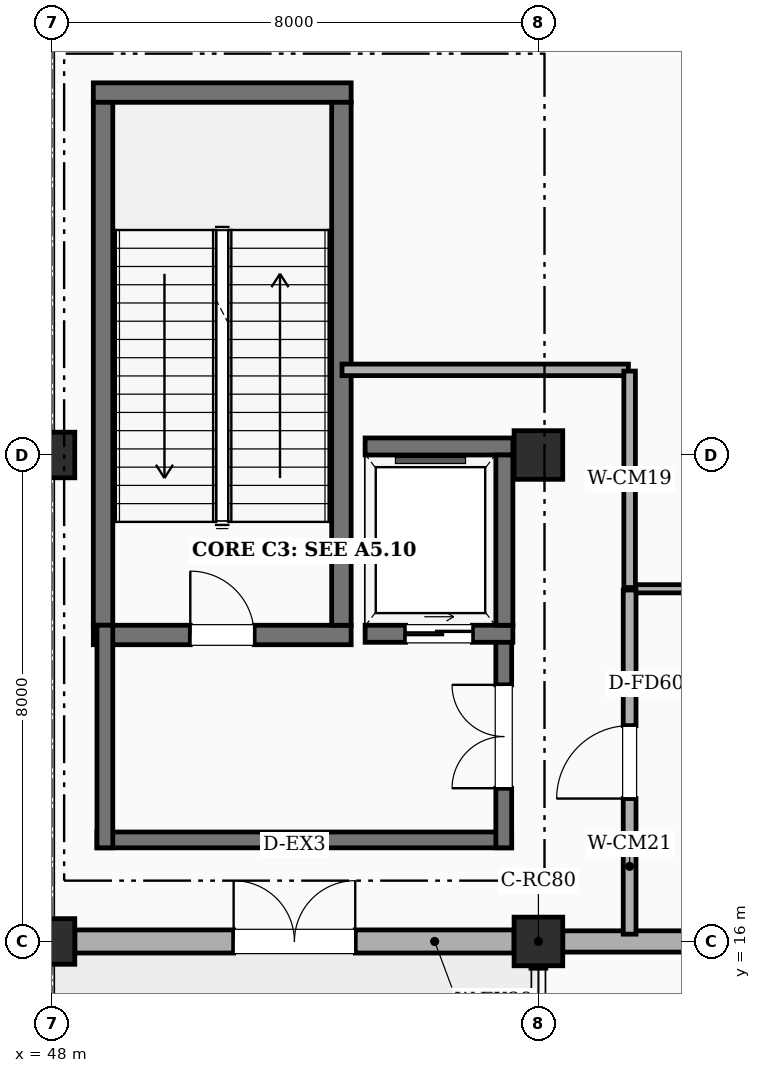
"""IFC4 building model, lengths in metres.
Left out: names, types, materials, properties, quantities, classifications, styles, units other than length and angle.
Written with IfcOpenShell. Run it as: python <this file> out.ifc"""

import sys

from ifc_helpers import new_model, si_unit, direction, frame, frame_2d, origin, origin_2d, place, context, subcontext, project, spatial, rectangle, extrude, element, fill, save


model = new_model("IFC4")
c1 = context("Model", 3, precision=1e-05, world=origin(), true_north=direction((0.0, 1.0)))
c2 = subcontext(c1, "Body", "Model", "MODEL_VIEW")
j1 = project(units=[si_unit("LENGTHUNIT", "METRE"), si_unit("PLANEANGLEUNIT", "RADIAN")], contexts=[c1])
p1 = place(None, origin())
s1 = spatial("IfcSite", under=j1, at=p1, CompositionType="ELEMENT")
p2 = place(p1, origin())
s2 = spatial("IfcBuilding", under=s1, at=p2, CompositionType="ELEMENT")
p3 = place(p2, origin())
s3 = spatial("IfcBuildingStorey", under=s2, at=p3, CompositionType="ELEMENT", Elevation=0.0)
for number, where, z_axis, x_axis in (
    (1, (48.0, 16.0, 0.0), (0.0, 0.0, 1.0), (1.0, 0.0, 0.0)),
    (2, (48.0, 24.0, 0.0), (0.0, 0.0, 1.0), (1.0, 0.0, 0.0)),
):
    element("IfcColumn", number, at=place(p3, frame(where, z_axis=z_axis, x_axis=x_axis)), inside=s3, PredefinedType="COLUMN", context=c2, shape_type="SweptSolid", body=[
        extrude(rectangle(XDim=0.75, YDim=0.75, at=origin_2d()), origin(), (0.0, 0.0, 1.0), 5.4),
    ])
for number, where, z_axis, x_axis in (
    (3, (56.0, 16.0, 0.0), (0.0, 0.0, 1.0), (1.0, 0.0, 0.0)),
    (4, (56.0, 24.0, 0.0), (0.0, 0.0, 1.0), (1.0, 0.0, 0.0)),
):
    element("IfcColumn", number, at=place(p3, frame(where, z_axis=z_axis, x_axis=x_axis)), inside=s3, PredefinedType="COLUMN", context=c2, shape_type="SweptSolid", body=[
        extrude(rectangle(XDim=0.8, YDim=0.8, at=origin_2d()), origin(), (0.0, 0.0, 1.0), 5.4),
    ])
p4 = place(p3, frame((48.375, 16.0, 0.0), z_axis=(0.0, 0.0, 1.0), x_axis=(1.0, 0.0, 0.0)))
e5 = element("IfcWall", 5, at=p4, inside=s3, PredefinedType="STANDARD", context=c2, shape_type="SweptSolid", body=[
    extrude(rectangle(XDim=7.225, YDim=0.38, at=frame_2d((3.613, 0.0))), origin(), (0.0, 0.0, 1.0), 4.42),
])
p5 = place(p4, frame((2.613, 0.0, 0.0)))
e6 = element("IfcOpeningElement", 6, at=p5, cuts=e5, PredefinedType="OPENING", context=c2, shape_type="SweptSolid", body=[
    extrude(rectangle(XDim=2.0, YDim=2.4, at=frame_2d((1.0, 1.2))), frame((0.0, 0.2, 0.0), z_axis=(0.0, -1.0, 0.0), x_axis=(1.0, 0.0, 0.0)), (0.0, 0.0, 1.0), 0.4),
])
p6 = place(p3, frame((56.4, 16.0, 0.0), z_axis=(0.0, 0.0, 1.0), x_axis=(1.0, 0.0, 0.0)))
e7 = element("IfcWall", 7, at=p6, inside=s3, PredefinedType="STANDARD", context=c2, shape_type="SweptSolid", body=[
    extrude(rectangle(XDim=7.2, YDim=0.35, at=frame_2d((3.6, 0.0))), origin(), (0.0, 0.0, 1.0), 4.42),
])
p7 = place(p6, frame((2.4, 0.0, 0.0)))
e8 = element("IfcOpeningElement", 8, at=p7, cuts=e7, PredefinedType="OPENING", context=c2, shape_type="SweptSolid", body=[
    extrude(rectangle(XDim=2.4, YDim=2.6, at=frame_2d((1.2, 1.3))), frame((0.0, 0.185, 0.0), z_axis=(0.0, -1.0, 0.0), x_axis=(1.0, 0.0, 0.0)), (0.0, 0.0, 1.0), 0.37),
])
p8 = place(p3, frame((48.68, 21.04, 0.0), z_axis=(0.0, 0.0, 1.0), x_axis=(1.0, 0.0, 0.0)))
e9 = element("IfcWall", 9, at=p8, inside=s3, PredefinedType="SHEAR", context=c2, shape_type="SweptSolid", body=[
    extrude(rectangle(XDim=4.24, YDim=0.32, at=frame_2d((2.12, 0.0))), origin(), (0.0, 0.0, 1.0), 5.4),
])
p9 = place(p8, frame((1.595, 0.0, 0.0)))
e10 = element("IfcOpeningElement", 10, at=p9, cuts=e9, PredefinedType="OPENING", context=c2, shape_type="SweptSolid", body=[
    extrude(rectangle(XDim=1.05, YDim=2.15, at=frame_2d((0.525, 1.075))), frame((0.0, 0.17, 0.0), z_axis=(0.0, -1.0, 0.0), x_axis=(1.0, 0.0, 0.0)), (0.0, 0.0, 1.0), 0.34),
])
p10 = place(p3, frame((48.68, 29.96, 0.0), z_axis=(0.0, 0.0, 1.0), x_axis=(1.0, 0.0, 0.0)))
e11 = element("IfcWall", 11, at=p10, inside=s3, PredefinedType="SHEAR", context=c2, shape_type="SweptSolid", body=[
    extrude(rectangle(XDim=4.24, YDim=0.32, at=frame_2d((2.12, 0.0))), origin(), (0.0, 0.0, 1.0), 5.4),
])
for number, where, z_axis, x_axis in (
    (12, (48.84, 21.2, 0.0), (0.0, 0.0, 1.0), (0.0, 1.0, 0.0)),
    (13, (52.76, 21.2, 0.0), (0.0, 0.0, 1.0), (0.0, 1.0, 0.0)),
):
    element("IfcWall", number, at=place(p3, frame(where, z_axis=z_axis, x_axis=x_axis)), inside=s3, PredefinedType="SHEAR", context=c2, shape_type="SweptSolid", body=[
        extrude(rectangle(XDim=8.6, YDim=0.32, at=frame_2d((4.3, 0.0))), origin(), (0.0, 0.0, 1.0), 5.4),
    ])
p11 = place(p3, frame((55.56, 17.67, 0.0), z_axis=(0.0, 0.0, 1.0), x_axis=(-1.0, 0.0, 0.0)))
e14 = element("IfcWall", 14, at=p11, inside=s3, PredefinedType="SHEAR", context=c2, shape_type="SweptSolid", body=[
    extrude(rectangle(XDim=6.82, YDim=0.26, at=frame_2d((3.41, 0.0))), origin(), (0.0, 0.0, 1.0), 5.4),
])
p12 = place(p3, frame((48.87, 17.54, 0.0), z_axis=(0.0, 0.0, 1.0), x_axis=(0.0, 1.0, 0.0)))
e15 = element("IfcWall", 15, at=p12, inside=s3, PredefinedType="SHEAR", context=c2, shape_type="SweptSolid", body=[
    extrude(rectangle(XDim=3.66, YDim=0.26, at=frame_2d((1.83, 0.0))), origin(), (0.0, 0.0, 1.0), 5.4),
])
p13 = place(p3, frame((55.43, 17.54, 0.0), z_axis=(0.0, 0.0, 1.0), x_axis=(0.0, 1.0, 0.0)))
e16 = element("IfcWall", 16, at=p13, inside=s3, PredefinedType="SHEAR", context=c2, shape_type="SweptSolid", body=[
    extrude(rectangle(XDim=3.66, YDim=0.26, at=frame_2d((1.83, 0.0))), origin(), (0.0, 0.0, 1.0), 5.4),
])
p14 = place(p13, frame((0.98, 0.0, 0.0)))
e17 = element("IfcOpeningElement", 17, at=p14, cuts=e16, PredefinedType="OPENING", context=c2, shape_type="SweptSolid", body=[
    extrude(rectangle(XDim=1.7, YDim=2.2, at=frame_2d((0.85, 1.1))), frame((0.0, 0.14, 0.0), z_axis=(0.0, -1.0, 0.0), x_axis=(1.0, 0.0, 0.0)), (0.0, 0.0, 1.0), 0.28),
])
p15 = place(p3, frame((53.15, 21.06, 0.0), z_axis=(0.0, 0.0, 1.0), x_axis=(1.0, 0.0, 0.0)))
e18 = element("IfcWall", 18, at=p15, inside=s3, PredefinedType="SHEAR", context=c2, shape_type="SweptSolid", body=[
    extrude(rectangle(XDim=2.43, YDim=0.28, at=frame_2d((1.215, 0.0))), origin(), (0.0, 0.0, 1.0), 5.4),
])
p16 = place(p15, frame((0.665, 0.0, 0.0)))
e19 = element("IfcOpeningElement", 19, at=p16, cuts=e18, PredefinedType="OPENING", context=c2, shape_type="SweptSolid", body=[
    extrude(rectangle(XDim=1.1, YDim=2.15, at=frame_2d((0.55, 1.075))), frame((0.0, 0.15, 0.0), z_axis=(0.0, -1.0, 0.0), x_axis=(1.0, 0.0, 0.0)), (0.0, 0.0, 1.0), 0.3),
])
p17 = place(p3, frame((53.15, 24.14, 0.0), z_axis=(0.0, 0.0, 1.0), x_axis=(1.0, 0.0, 0.0)))
e20 = element("IfcWall", 20, at=p17, inside=s3, PredefinedType="SHEAR", context=c2, shape_type="SweptSolid", body=[
    extrude(rectangle(XDim=2.43, YDim=0.28, at=frame_2d((1.215, 0.0))), origin(), (0.0, 0.0, 1.0), 5.4),
])
p18 = place(p3, frame((55.44, 21.2, 0.0), z_axis=(0.0, 0.0, 1.0), x_axis=(0.0, 1.0, 0.0)))
e21 = element("IfcWall", 21, at=p18, inside=s3, PredefinedType="SHEAR", context=c2, shape_type="SweptSolid", body=[
    extrude(rectangle(XDim=2.8, YDim=0.28, at=frame_2d((1.4, 0.0))), origin(), (0.0, 0.0, 1.0), 5.4),
])
p19 = place(p3, frame((57.52, 21.8, 0.0), z_axis=(0.0, 0.0, 1.0), x_axis=(1.0, 0.0, 0.0)))
e22 = element("IfcWall", 22, at=p19, inside=s3, PredefinedType="PARTITIONING", context=c2, shape_type="SweptSolid", body=[
    extrude(rectangle(XDim=52.96, YDim=0.135, at=frame_2d((26.48, 0.0))), origin(), (0.0, 0.0, 1.0), 4.27),
])
p20 = place(p19, frame((25.555, 0.0, 0.0)))
e23 = element("IfcOpeningElement", 23, at=p20, cuts=e22, PredefinedType="OPENING", context=c2, shape_type="SweptSolid", body=[
    extrude(rectangle(XDim=1.85, YDim=2.3, at=frame_2d((0.925, 1.15))), frame((0.0, 0.077, 0.0), z_axis=(0.0, -1.0, 0.0), x_axis=(1.0, 0.0, 0.0)), (0.0, 0.0, 1.0), 0.155),
])
p21 = place(p3, frame((52.77, 25.4, 0.0), z_axis=(0.0, 0.0, 1.0), x_axis=(1.0, 0.0, 0.0)))
e24 = element("IfcWall", 24, at=p21, inside=s3, PredefinedType="SOLIDWALL", context=c2, shape_type="SweptSolid", body=[
    extrude(rectangle(XDim=4.71, YDim=0.19, at=frame_2d((2.355, 0.0))), origin(), (0.0, 0.0, 1.0), 4.27),
])
p22 = place(p3, frame((57.5, 16.12, 0.0), z_axis=(0.0, 0.0, 1.0), x_axis=(0.0, 1.0, 0.0)))
e25 = element("IfcWall", 25, at=p22, inside=s3, PredefinedType="SOLIDWALL", context=c2, shape_type="SweptSolid", body=[
    extrude(rectangle(XDim=5.66, YDim=0.21, at=frame_2d((2.83, 0.0))), origin(), (0.0, 0.0, 1.0), 4.42),
])
p23 = place(p22, frame((2.23, 0.0, 0.0)))
e26 = element("IfcOpeningElement", 26, at=p23, cuts=e25, PredefinedType="OPENING", context=c2, shape_type="SweptSolid", body=[
    extrude(rectangle(XDim=1.2, YDim=2.15, at=frame_2d((0.6, 1.075))), frame((0.0, 0.115, 0.0), z_axis=(0.0, -1.0, 0.0), x_axis=(1.0, 0.0, 0.0)), (0.0, 0.0, 1.0), 0.23),
])
p24 = place(p3, frame((57.5, 21.82, 0.0), z_axis=(0.0, 0.0, 1.0), x_axis=(0.0, 1.0, 0.0)))
e27 = element("IfcWall", 27, at=p24, inside=s3, PredefinedType="SOLIDWALL", context=c2, shape_type="SweptSolid", body=[
    extrude(rectangle(XDim=3.56, YDim=0.19, at=frame_2d((1.78, 0.0))), origin(), (0.0, 0.0, 1.0), 4.27),
])
p25 = place(p5, frame((2.0, 0.0, 0.0), z_axis=(0.0, 0.0, 1.0), x_axis=(-1.0, 0.0, 0.0)))
e28 = element("IfcDoor", 28, at=p25, inside=s3, OperationType="DOUBLE_DOOR_SINGLE_SWING", PredefinedType="DOOR", context=c2, shape_type="SweptSolid", body=[
    extrude(rectangle(XDim=2.0, YDim=2.4, at=frame_2d((-1.0, 1.2))), frame((0.0, -0.025, 0.0), z_axis=(0.0, 1.0, 0.0), x_axis=(-1.0, 0.0, 0.0)), (0.0, 0.0, 1.0), 0.05),
])
fill(e6, e28)
p26 = place(p9, origin())
e29 = element("IfcDoor", 29, at=p26, inside=s3, OperationType="SINGLE_SWING_LEFT", PredefinedType="DOOR", context=c2, shape_type="SweptSolid", body=[
    extrude(rectangle(XDim=1.05, YDim=2.15, at=frame_2d((0.525, 1.075))), frame((0.0, 0.025, 0.0), z_axis=(0.0, -1.0, 0.0), x_axis=(1.0, 0.0, 0.0)), (0.0, 0.0, 1.0), 0.05),
])
fill(e10, e29)
p27 = place(p14, origin())
e30 = element("IfcDoor", 30, at=p27, inside=s3, OperationType="DOUBLE_DOOR_SINGLE_SWING", PredefinedType="DOOR", context=c2, shape_type="SweptSolid", body=[
    extrude(rectangle(XDim=1.7, YDim=2.2, at=frame_2d((0.85, 1.1))), frame((0.0, 0.025, 0.0), z_axis=(0.0, -1.0, 0.0), x_axis=(1.0, 0.0, 0.0)), (0.0, 0.0, 1.0), 0.05),
])
fill(e17, e30)
p28 = place(p16, origin())
e31 = element("IfcDoor", 31, at=p28, inside=s3, OperationType="SLIDING_TO_LEFT", PredefinedType="DOOR", context=c2, shape_type="SweptSolid", body=[
    extrude(rectangle(XDim=1.1, YDim=2.15, at=frame_2d((0.55, 1.075))), frame((0.0, 0.025, 0.0), z_axis=(0.0, -1.0, 0.0), x_axis=(1.0, 0.0, 0.0)), (0.0, 0.0, 1.0), 0.05),
])
fill(e19, e31)
p29 = place(p23, origin())
e32 = element("IfcDoor", 32, at=p29, inside=s3, OperationType="SINGLE_SWING_LEFT", PredefinedType="DOOR", context=c2, shape_type="SweptSolid", body=[
    extrude(rectangle(XDim=1.2, YDim=2.15, at=frame_2d((0.6, 1.075))), frame((0.0, 0.025, 0.0), z_axis=(0.0, -1.0, 0.0), x_axis=(1.0, 0.0, 0.0)), (0.0, 0.0, 1.0), 0.05),
])
fill(e26, e32)
save(model, sys.argv[1])
